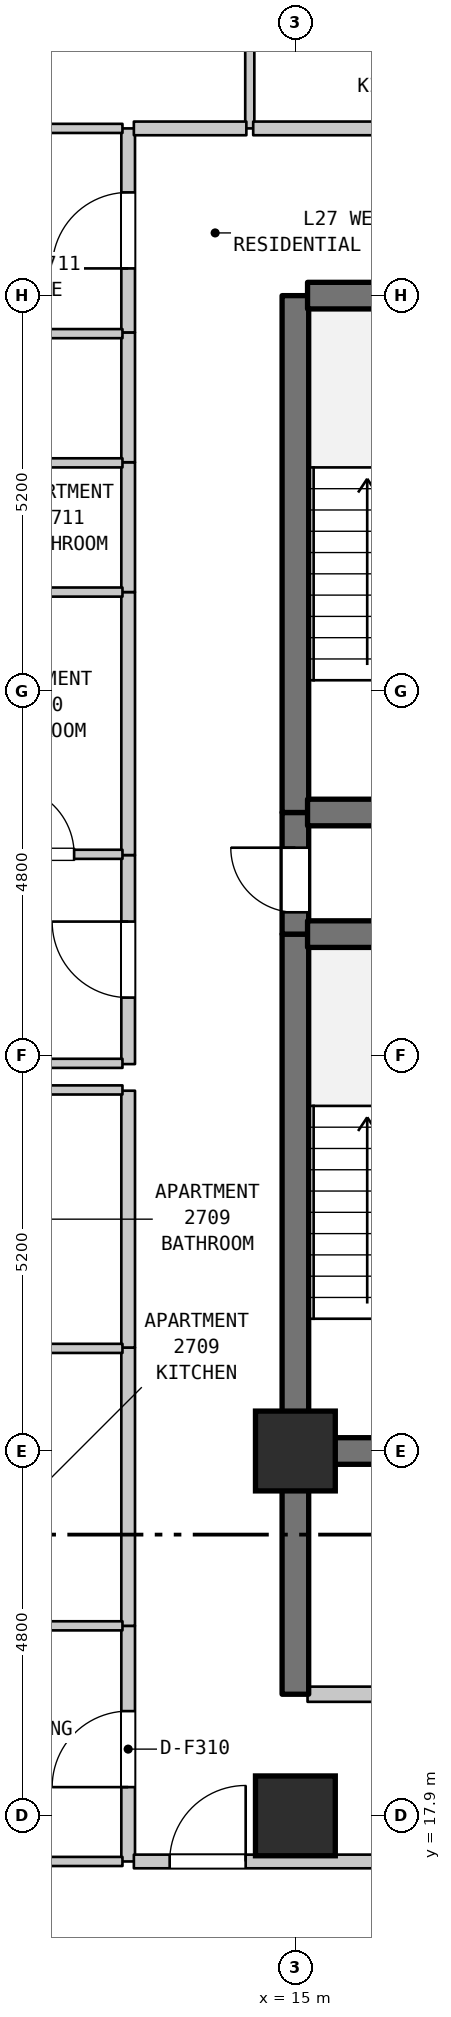
"""IFC4 building model, lengths in metres.
Left out: names, types, materials, properties, quantities, classifications, styles, units other than length and angle.
Written with IfcOpenShell. Run it as: python <this file> out.ifc"""

import sys

from ifc_helpers import new_model, si_unit, direction, frame, frame_2d, origin, origin_2d, place, context, subcontext, project, spatial, rectangle, extrude, element, fill, save


model = new_model("IFC4")
c1 = context("Model", 3, precision=1e-05, world=origin(), true_north=direction((0.0, 1.0)))
c2 = subcontext(c1, "Body", "Model", "MODEL_VIEW")
j1 = project(units=[si_unit("LENGTHUNIT", "METRE"), si_unit("PLANEANGLEUNIT", "RADIAN")], contexts=[c1])
p1 = place(None, origin())
s1 = spatial("IfcSite", under=j1, at=p1, CompositionType="ELEMENT")
p2 = place(p1, origin())
s2 = spatial("IfcBuilding", under=s1, at=p2, CompositionType="ELEMENT")
p3 = place(p2, frame((0.0, 0.0, 113.1)))
s3 = spatial("IfcBuildingStorey", under=s2, at=p3, CompositionType="ELEMENT", Elevation=113.1)
for number, where, z_axis, x_axis in (
    (1, (15.0, 17.9, 0.0), (0.0, 0.0, 1.0), (1.0, 0.0, 0.0)),
    (2, (15.0, 22.7, 0.0), (0.0, 0.0, 1.0), (1.0, 0.0, 0.0)),
):
    element("IfcColumn", number, at=place(p3, frame(where, z_axis=z_axis, x_axis=x_axis)), inside=s3, PredefinedType="COLUMN", context=c2, shape_type="SweptSolid", body=[
        extrude(rectangle(XDim=1.05, YDim=1.05, at=origin_2d()), origin(), (0.0, 0.0, 1.0), 3.7),
    ])
p4 = place(p3, frame((12.8, 17.3, 0.0), z_axis=(0.0, 0.0, 1.0), x_axis=(0.0, 1.0, 0.0)))
e3 = element("IfcWall", 3, at=p4, inside=s3, PredefinedType="STANDARD", context=c2, shape_type="SweptSolid", body=[
    extrude(rectangle(XDim=3.1, YDim=0.18, at=frame_2d((1.55, 0.0))), origin(), (0.0, 0.0, 1.0), 3.385),
])
p5 = place(p4, frame((0.978, 0.0, 0.0)))
e4 = element("IfcOpeningElement", 4, at=p5, cuts=e3, PredefinedType="OPENING", context=c2, shape_type="SweptSolid", body=[
    extrude(rectangle(XDim=1.0, YDim=2.15, at=frame_2d((0.5, 1.075))), frame((0.0, 0.1, 0.0), z_axis=(0.0, -1.0, 0.0), x_axis=(1.0, 0.0, 0.0)), (0.0, 0.0, 1.0), 0.2),
])
p6 = place(p3, frame((12.8, 20.4, 0.0), z_axis=(0.0, 0.0, 1.0), x_axis=(0.0, 1.0, 0.0)))
e5 = element("IfcWall", 5, at=p6, inside=s3, PredefinedType="STANDARD", context=c2, shape_type="SweptSolid", body=[
    extrude(rectangle(XDim=3.661, YDim=0.18, at=frame_2d((1.831, 0.0))), origin(), (0.0, 0.0, 1.0), 3.385),
])
p7 = place(p3, frame((12.8, 24.061, 0.0), z_axis=(0.0, 0.0, 1.0), x_axis=(0.0, 1.0, 0.0)))
e6 = element("IfcWall", 6, at=p7, inside=s3, PredefinedType="STANDARD", context=c2, shape_type="SweptSolid", body=[
    extrude(rectangle(XDim=3.379, YDim=0.18, at=frame_2d((1.689, 0.0))), origin(), (0.0, 0.0, 1.0), 3.385),
])
p8 = place(p3, frame((12.8, 27.79, 0.0), z_axis=(0.0, 0.0, 1.0), x_axis=(0.0, 1.0, 0.0)))
e7 = element("IfcWall", 7, at=p8, inside=s3, PredefinedType="STANDARD", context=c2, shape_type="SweptSolid", body=[
    extrude(rectangle(XDim=2.75, YDim=0.18, at=frame_2d((1.375, 0.0))), origin(), (0.0, 0.0, 1.0), 3.385),
])
p9 = place(p8, frame((0.875, 0.0, 0.0)))
e8 = element("IfcOpeningElement", 8, at=p9, cuts=e7, PredefinedType="OPENING", context=c2, shape_type="SweptSolid", body=[
    extrude(rectangle(XDim=1.0, YDim=2.15, at=frame_2d((0.5, 1.075))), frame((0.0, 0.1, 0.0), z_axis=(0.0, -1.0, 0.0), x_axis=(1.0, 0.0, 0.0)), (0.0, 0.0, 1.0), 0.2),
])
p10 = place(p3, frame((12.8, 30.54, 0.0), z_axis=(0.0, 0.0, 1.0), x_axis=(0.0, 1.0, 0.0)))
e9 = element("IfcWall", 9, at=p10, inside=s3, PredefinedType="STANDARD", context=c2, shape_type="SweptSolid", body=[
    extrude(rectangle(XDim=3.46, YDim=0.18, at=frame_2d((1.73, 0.0))), origin(), (0.0, 0.0, 1.0), 3.385),
])
for number, where, z_axis, x_axis in (
    (10, (12.8, 34.0, 0.0), (0.0, 0.0, 1.0), (0.0, 1.0, 0.0)),
    (11, (12.8, 35.708, 0.0), (0.0, 0.0, 1.0), (0.0, 1.0, 0.0)),
):
    element("IfcWall", number, at=place(p3, frame(where, z_axis=z_axis, x_axis=x_axis)), inside=s3, PredefinedType="STANDARD", context=c2, shape_type="SweptSolid", body=[
        extrude(rectangle(XDim=1.708, YDim=0.18, at=frame_2d((0.854, 0.0))), origin(), (0.0, 0.0, 1.0), 3.385),
    ])
p11 = place(p3, frame((12.8, 37.416, 0.0), z_axis=(0.0, 0.0, 1.0), x_axis=(0.0, 1.0, 0.0)))
e12 = element("IfcWall", 12, at=p11, inside=s3, PredefinedType="STANDARD", context=c2, shape_type="SweptSolid", body=[
    extrude(rectangle(XDim=2.684, YDim=0.18, at=frame_2d((1.342, 0.0))), origin(), (0.0, 0.0, 1.0), 3.385),
])
p12 = place(p11, frame((0.842, 0.0, 0.0)))
e13 = element("IfcOpeningElement", 13, at=p12, cuts=e12, PredefinedType="OPENING", context=c2, shape_type="SweptSolid", body=[
    extrude(rectangle(XDim=1.0, YDim=2.15, at=frame_2d((0.5, 1.075))), frame((0.0, 0.1, 0.0), z_axis=(0.0, -1.0, 0.0), x_axis=(1.0, 0.0, 0.0)), (0.0, 0.0, 1.0), 0.2),
])
p13 = place(p3, frame((14.4, 40.1, 0.0), z_axis=(0.0, 0.0, 1.0), x_axis=(0.0, 1.0, 0.0)))
e14 = element("IfcWall", 14, at=p13, inside=s3, PredefinedType="PARTITIONING", context=c2, shape_type="SweptSolid", body=[
    extrude(rectangle(XDim=2.3, YDim=0.12, at=frame_2d((1.15, 0.0))), origin(), (0.0, 0.0, 1.0), 3.385),
])
p14 = place(p3, frame((15.0, 19.5, 0.0), z_axis=(0.0, 0.0, 1.0), x_axis=(0.0, 1.0, 0.0)))
e15 = element("IfcWall", 15, at=p14, inside=s3, PredefinedType="SHEAR", context=c2, shape_type="SweptSolid", body=[
    extrude(rectangle(XDim=3.2, YDim=0.35, at=frame_2d((1.6, 0.0))), origin(), (0.0, 0.0, 1.0), 3.385),
])
p15 = place(p3, frame((15.0, 22.7, 0.0), z_axis=(0.0, 0.0, 1.0), x_axis=(0.0, 1.0, 0.0)))
e16 = element("IfcWall", 16, at=p15, inside=s3, PredefinedType="SHEAR", context=c2, shape_type="SweptSolid", body=[
    extrude(rectangle(XDim=6.8, YDim=0.35, at=frame_2d((3.4, 0.0))), origin(), (0.0, 0.0, 1.0), 3.385),
])
p16 = place(p3, frame((15.0, 29.5, 0.0), z_axis=(0.0, 0.0, 1.0), x_axis=(0.0, 1.0, 0.0)))
e17 = element("IfcWall", 17, at=p16, inside=s3, PredefinedType="SHEAR", context=c2, shape_type="SweptSolid", body=[
    extrude(rectangle(XDim=1.6, YDim=0.35, at=frame_2d((0.8, 0.0))), origin(), (0.0, 0.0, 1.0), 3.385),
])
p17 = place(p16, frame((0.287, 0.0, 0.0)))
e18 = element("IfcOpeningElement", 18, at=p17, cuts=e17, PredefinedType="OPENING", context=c2, shape_type="SweptSolid", body=[
    extrude(rectangle(XDim=0.85, YDim=2.1, at=frame_2d((0.425, 1.05))), frame((0.0, 0.185, 0.0), z_axis=(0.0, -1.0, 0.0), x_axis=(1.0, 0.0, 0.0)), (0.0, 0.0, 1.0), 0.37),
])
p18 = place(p3, frame((15.0, 31.1, 0.0), z_axis=(0.0, 0.0, 1.0), x_axis=(0.0, 1.0, 0.0)))
e19 = element("IfcWall", 19, at=p18, inside=s3, PredefinedType="SHEAR", context=c2, shape_type="SweptSolid", body=[
    extrude(rectangle(XDim=6.8, YDim=0.35, at=frame_2d((3.4, 0.0))), origin(), (0.0, 0.0, 1.0), 3.385),
])
p19 = place(p3, frame((9.085, 17.3, 0.0), z_axis=(0.0, 0.0, 1.0), x_axis=(1.0, 0.0, 0.0)))
e20 = element("IfcWall", 20, at=p19, inside=s3, PredefinedType="PARTITIONING", context=c2, shape_type="SweptSolid", body=[
    extrude(rectangle(XDim=3.64, YDim=0.12, at=frame_2d((1.82, 0.0))), origin(), (0.0, 0.0, 1.0), 3.385),
])
p20 = place(p3, frame((12.875, 17.3, 0.0), z_axis=(0.0, 0.0, 1.0), x_axis=(1.0, 0.0, 0.0)))
e21 = element("IfcWall", 21, at=p20, inside=s3, PredefinedType="STANDARD", context=c2, shape_type="SweptSolid", body=[
    extrude(rectangle(XDim=3.28, YDim=0.18, at=frame_2d((1.64, 0.0))), origin(), (0.0, 0.0, 1.0), 3.385),
])
p21 = place(p20, frame((0.471, 0.0, 0.0)))
e22 = element("IfcOpeningElement", 22, at=p21, cuts=e21, PredefinedType="OPENING", context=c2, shape_type="SweptSolid", body=[
    extrude(rectangle(XDim=1.0, YDim=2.15, at=frame_2d((0.5, 1.075))), frame((0.0, 0.1, 0.0), z_axis=(0.0, -1.0, 0.0), x_axis=(1.0, 0.0, 0.0)), (0.0, 0.0, 1.0), 0.2),
])
p22 = place(p3, frame((15.16, 19.5, 0.0), z_axis=(0.0, 0.0, 1.0), x_axis=(1.0, 0.0, 0.0)))
e23 = element("IfcWall", 23, at=p22, inside=s3, PredefinedType="STANDARD", context=c2, shape_type="SweptSolid", body=[
    extrude(rectangle(XDim=3.68, YDim=0.2, at=frame_2d((1.84, 0.0))), origin(), (0.0, 0.0, 1.0), 3.385),
])
p23 = place(p22, frame((1.39, 0.0, 0.0)))
e24 = element("IfcOpeningElement", 24, at=p23, cuts=e23, PredefinedType="OPENING", context=c2, shape_type="SweptSolid", body=[
    extrude(rectangle(XDim=0.9, YDim=2.15, at=frame_2d((0.45, 1.075))), frame((0.0, 0.11, 0.0), z_axis=(0.0, -1.0, 0.0), x_axis=(1.0, 0.0, 0.0)), (0.0, 0.0, 1.0), 0.22),
])
p24 = place(p3, frame((10.595, 20.4, 0.0), z_axis=(0.0, 0.0, 1.0), x_axis=(1.0, 0.0, 0.0)))
e25 = element("IfcWall", 25, at=p24, inside=s3, PredefinedType="PARTITIONING", context=c2, shape_type="SweptSolid", body=[
    extrude(rectangle(XDim=2.13, YDim=0.12, at=frame_2d((1.065, 0.0))), origin(), (0.0, 0.0, 1.0), 3.385),
])
p25 = place(p3, frame((15.16, 22.7, 0.0), z_axis=(0.0, 0.0, 1.0), x_axis=(1.0, 0.0, 0.0)))
e26 = element("IfcWall", 26, at=p25, inside=s3, PredefinedType="SHEAR", context=c2, shape_type="SweptSolid", body=[
    extrude(rectangle(XDim=3.68, YDim=0.35, at=frame_2d((1.84, 0.0))), origin(), (0.0, 0.0, 1.0), 3.385),
])
for number, where, z_axis, x_axis in (
    (27, (10.595, 24.05, 0.0), (0.0, 0.0, 1.0), (1.0, 0.0, 0.0)),
    (28, (10.595, 27.45, 0.0), (0.0, 0.0, 1.0), (1.0, 0.0, 0.0)),
):
    element("IfcWall", number, at=place(p3, frame(where, z_axis=z_axis, x_axis=x_axis)), inside=s3, PredefinedType="PARTITIONING", context=c2, shape_type="SweptSolid", body=[
        extrude(rectangle(XDim=2.13, YDim=0.12, at=frame_2d((1.065, 0.0))), origin(), (0.0, 0.0, 1.0), 3.385),
    ])
p26 = place(p3, frame((9.03, 27.8, 0.0), z_axis=(0.0, 0.0, 1.0), x_axis=(1.0, 0.0, 0.0)))
e29 = element("IfcWall", 29, at=p26, inside=s3, PredefinedType="PARTITIONING", context=c2, shape_type="SweptSolid", body=[
    extrude(rectangle(XDim=3.695, YDim=0.12, at=frame_2d((1.848, 0.0))), origin(), (0.0, 0.0, 1.0), 3.385),
])
p27 = place(p3, frame((15.16, 29.5, 0.0), z_axis=(0.0, 0.0, 1.0), x_axis=(1.0, 0.0, 0.0)))
e30 = element("IfcWall", 30, at=p27, inside=s3, PredefinedType="SHEAR", context=c2, shape_type="SweptSolid", body=[
    extrude(rectangle(XDim=3.68, YDim=0.35, at=frame_2d((1.84, 0.0))), origin(), (0.0, 0.0, 1.0), 3.385),
])
p28 = place(p3, frame((10.523, 30.55, 0.0), z_axis=(0.0, 0.0, 1.0), x_axis=(1.0, 0.0, 0.0)))
e31 = element("IfcWall", 31, at=p28, inside=s3, PredefinedType="PARTITIONING", context=c2, shape_type="SweptSolid", body=[
    extrude(rectangle(XDim=2.202, YDim=0.12, at=frame_2d((1.101, 0.0))), origin(), (0.0, 0.0, 1.0), 3.385),
])
p29 = place(p28, frame((0.666, 0.0, 0.0)))
e32 = element("IfcOpeningElement", 32, at=p29, cuts=e31, PredefinedType="OPENING", context=c2, shape_type="SweptSolid", body=[
    extrude(rectangle(XDim=0.9, YDim=2.1, at=frame_2d((0.45, 1.05))), frame((0.0, 0.07, 0.0), z_axis=(0.0, -1.0, 0.0), x_axis=(1.0, 0.0, 0.0)), (0.0, 0.0, 1.0), 0.14),
])
p30 = place(p3, frame((15.16, 31.1, 0.0), z_axis=(0.0, 0.0, 1.0), x_axis=(1.0, 0.0, 0.0)))
e33 = element("IfcWall", 33, at=p30, inside=s3, PredefinedType="SHEAR", context=c2, shape_type="SweptSolid", body=[
    extrude(rectangle(XDim=3.68, YDim=0.35, at=frame_2d((1.84, 0.0))), origin(), (0.0, 0.0, 1.0), 3.385),
])
for number, where, z_axis, x_axis in (
    (34, (10.545, 34.0, 0.0), (0.0, 0.0, 1.0), (1.0, 0.0, 0.0)),
    (35, (10.545, 35.7, 0.0), (0.0, 0.0, 1.0), (1.0, 0.0, 0.0)),
    (36, (10.545, 37.4, 0.0), (0.0, 0.0, 1.0), (1.0, 0.0, 0.0)),
):
    element("IfcWall", number, at=place(p3, frame(where, z_axis=z_axis, x_axis=x_axis)), inside=s3, PredefinedType="PARTITIONING", context=c2, shape_type="SweptSolid", body=[
        extrude(rectangle(XDim=2.18, YDim=0.12, at=frame_2d((1.09, 0.0))), origin(), (0.0, 0.0, 1.0), 3.385),
    ])
p31 = place(p3, frame((15.16, 37.9, 0.0), z_axis=(0.0, 0.0, 1.0), x_axis=(1.0, 0.0, 0.0)))
e37 = element("IfcWall", 37, at=p31, inside=s3, PredefinedType="SHEAR", context=c2, shape_type="SweptSolid", body=[
    extrude(rectangle(XDim=3.68, YDim=0.35, at=frame_2d((1.84, 0.0))), origin(), (0.0, 0.0, 1.0), 3.385),
])
p32 = place(p3, frame((9.702, 40.1, 0.0), z_axis=(0.0, 0.0, 1.0), x_axis=(1.0, 0.0, 0.0)))
e38 = element("IfcWall", 38, at=p32, inside=s3, PredefinedType="PARTITIONING", context=c2, shape_type="SweptSolid", body=[
    extrude(rectangle(XDim=3.023, YDim=0.12, at=frame_2d((1.512, 0.0))), origin(), (0.0, 0.0, 1.0), 3.385),
])
p33 = place(p3, frame((12.875, 40.1, 0.0), z_axis=(0.0, 0.0, 1.0), x_axis=(1.0, 0.0, 0.0)))
e39 = element("IfcWall", 39, at=p33, inside=s3, PredefinedType="STANDARD", context=c2, shape_type="SweptSolid", body=[
    extrude(rectangle(XDim=1.48, YDim=0.18, at=frame_2d((0.74, 0.0))), origin(), (0.0, 0.0, 1.0), 3.385),
])
p34 = place(p3, frame((14.445, 40.1, 0.0), z_axis=(0.0, 0.0, 1.0), x_axis=(1.0, 0.0, 0.0)))
e40 = element("IfcWall", 40, at=p34, inside=s3, PredefinedType="STANDARD", context=c2, shape_type="SweptSolid", body=[
    extrude(rectangle(XDim=2.96, YDim=0.18, at=frame_2d((1.48, 0.0))), origin(), (0.0, 0.0, 1.0), 3.385),
])
p35 = place(p5, origin())
e41 = element("IfcDoor", 41, at=p35, inside=s3, OperationType="SINGLE_SWING_LEFT", PredefinedType="DOOR", context=c2, shape_type="SweptSolid", body=[
    extrude(rectangle(XDim=1.0, YDim=2.15, at=frame_2d((0.5, 1.075))), frame((0.0, 0.025, 0.0), z_axis=(0.0, -1.0, 0.0), x_axis=(1.0, 0.0, 0.0)), (0.0, 0.0, 1.0), 0.05),
])
fill(e4, e41)
p36 = place(p9, origin())
e42 = element("IfcDoor", 42, at=p36, inside=s3, OperationType="SINGLE_SWING_RIGHT", PredefinedType="DOOR", context=c2, shape_type="SweptSolid", body=[
    extrude(rectangle(XDim=1.0, YDim=2.15, at=frame_2d((0.5, 1.075))), frame((0.0, 0.025, 0.0), z_axis=(0.0, -1.0, 0.0), x_axis=(1.0, 0.0, 0.0)), (0.0, 0.0, 1.0), 0.05),
])
fill(e8, e42)
p37 = place(p12, origin())
e43 = element("IfcDoor", 43, at=p37, inside=s3, OperationType="SINGLE_SWING_LEFT", PredefinedType="DOOR", context=c2, shape_type="SweptSolid", body=[
    extrude(rectangle(XDim=1.0, YDim=2.15, at=frame_2d((0.5, 1.075))), frame((0.0, 0.025, 0.0), z_axis=(0.0, -1.0, 0.0), x_axis=(1.0, 0.0, 0.0)), (0.0, 0.0, 1.0), 0.05),
])
fill(e13, e43)
p38 = place(p17, origin())
e44 = element("IfcDoor", 44, at=p38, inside=s3, OperationType="SINGLE_SWING_RIGHT", PredefinedType="DOOR", context=c2, shape_type="SweptSolid", body=[
    extrude(rectangle(XDim=0.85, YDim=2.1, at=frame_2d((0.425, 1.05))), frame((0.0, 0.025, 0.0), z_axis=(0.0, -1.0, 0.0), x_axis=(1.0, 0.0, 0.0)), (0.0, 0.0, 1.0), 0.05),
])
fill(e18, e44)
p39 = place(p21, origin())
e45 = element("IfcDoor", 45, at=p39, inside=s3, OperationType="SINGLE_SWING_RIGHT", PredefinedType="DOOR", context=c2, shape_type="SweptSolid", body=[
    extrude(rectangle(XDim=1.0, YDim=2.15, at=frame_2d((0.5, 1.075))), frame((0.0, 0.025, 0.0), z_axis=(0.0, -1.0, 0.0), x_axis=(1.0, 0.0, 0.0)), (0.0, 0.0, 1.0), 0.05),
])
fill(e22, e45)
p40 = place(p29, origin())
e46 = element("IfcDoor", 46, at=p40, inside=s3, OperationType="SINGLE_SWING_LEFT", PredefinedType="DOOR", context=c2, shape_type="SweptSolid", body=[
    extrude(rectangle(XDim=0.9, YDim=2.1, at=frame_2d((0.45, 1.05))), frame((0.0, 0.025, 0.0), z_axis=(0.0, -1.0, 0.0), x_axis=(1.0, 0.0, 0.0)), (0.0, 0.0, 1.0), 0.05),
])
fill(e32, e46)
save(model, sys.argv[1])
